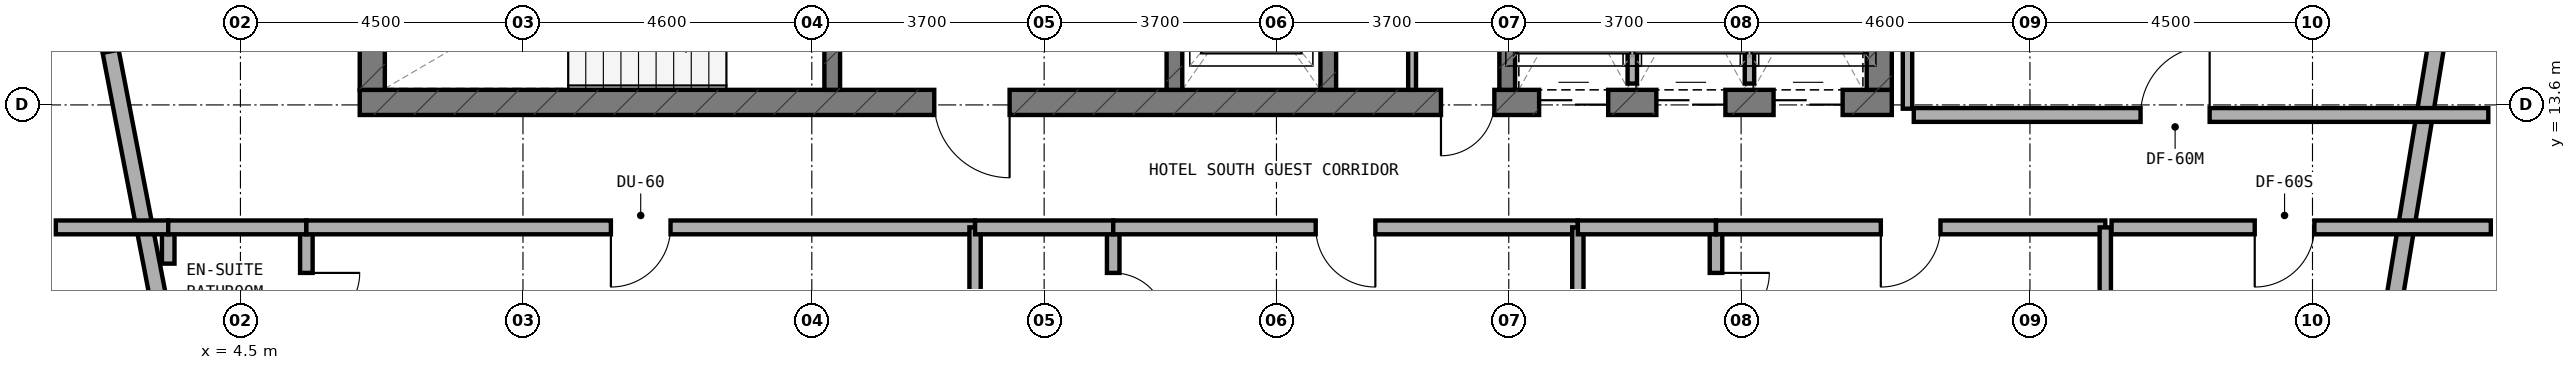
"""IFC4 building model, lengths in metres.
Left out: names, types, materials, properties, quantities, classifications, styles, units other than length and angle.
Written with IfcOpenShell. Run it as: python <this file> out.ifc"""

import sys

from ifc_helpers import new_model, si_unit, direction, frame, frame_2d, origin, place, context, subcontext, project, spatial, rectangle, extrude, element, fill, save


model = new_model("IFC4")
c1 = context("Model", 3, precision=1e-05, world=origin(), true_north=direction((0.0, 1.0)))
c2 = subcontext(c1, "Body", "Model", "MODEL_VIEW")
j1 = project(units=[si_unit("LENGTHUNIT", "METRE"), si_unit("PLANEANGLEUNIT", "RADIAN")], contexts=[c1])
p1 = place(None, origin())
s1 = spatial("IfcSite", under=j1, at=p1, CompositionType="ELEMENT")
p2 = place(p1, origin())
s2 = spatial("IfcBuilding", under=s1, at=p2, CompositionType="ELEMENT")
p3 = place(p2, frame((0.0, 0.0, 181.1)))
s3 = spatial("IfcBuildingStorey", under=s2, at=p3, CompositionType="ELEMENT", Elevation=181.1)
p4 = place(p3, frame((6.4, 13.64, 0.0), z_axis=(0.0, 0.0, 1.0), x_axis=(1.0, 0.0, 0.0)))
e1 = element("IfcWall", 1, at=p4, inside=s3, PredefinedType="SHEAR", context=c2, shape_type="SweptSolid", body=[
    extrude(rectangle(XDim=24.4, YDim=0.4, at=frame_2d((12.2, 0.0))), origin(), (0.0, 0.0, 1.0), 3.6),
])
p5 = place(p4, frame((9.15, 0.0, 0.0)))
e2 = element("IfcOpeningElement", 2, at=p5, cuts=e1, PredefinedType="OPENING", context=c2, shape_type="SweptSolid", body=[
    extrude(rectangle(XDim=1.2, YDim=2.15, at=frame_2d((0.6, 1.075))), frame((0.0, 0.21, 0.0), z_axis=(0.0, -1.0, 0.0), x_axis=(1.0, 0.0, 0.0)), (0.0, 0.0, 1.0), 0.42),
])
p6 = place(p4, frame((17.22, 0.0, 0.0)))
e3 = element("IfcOpeningElement", 3, at=p6, cuts=e1, PredefinedType="OPENING", context=c2, shape_type="SweptSolid", body=[
    extrude(rectangle(XDim=0.85, YDim=2.1, at=frame_2d((0.425, 1.05))), frame((0.0, 0.21, 0.0), z_axis=(0.0, -1.0, 0.0), x_axis=(1.0, 0.0, 0.0)), (0.0, 0.0, 1.0), 0.42),
])
p7 = place(p4, frame((18.783, 0.0, 0.0)))
e4 = element("IfcOpeningElement", 4, at=p7, cuts=e1, PredefinedType="OPENING", context=c2, shape_type="SweptSolid", body=[
    extrude(rectangle(XDim=1.1, YDim=2.15, at=frame_2d((0.55, 1.075))), frame((0.0, 0.21, 0.0), z_axis=(0.0, -1.0, 0.0), x_axis=(1.0, 0.0, 0.0)), (0.0, 0.0, 1.0), 0.42),
])
p8 = place(p4, frame((20.65, 0.0, 0.0)))
e5 = element("IfcOpeningElement", 5, at=p8, cuts=e1, PredefinedType="OPENING", context=c2, shape_type="SweptSolid", body=[
    extrude(rectangle(XDim=1.1, YDim=2.15, at=frame_2d((0.55, 1.075))), frame((0.0, 0.21, 0.0), z_axis=(0.0, -1.0, 0.0), x_axis=(1.0, 0.0, 0.0)), (0.0, 0.0, 1.0), 0.42),
])
p9 = place(p4, frame((22.517, 0.0, 0.0)))
e6 = element("IfcOpeningElement", 6, at=p9, cuts=e1, PredefinedType="OPENING", context=c2, shape_type="SweptSolid", body=[
    extrude(rectangle(XDim=1.1, YDim=2.15, at=frame_2d((0.55, 1.075))), frame((0.0, 0.21, 0.0), z_axis=(0.0, -1.0, 0.0), x_axis=(1.0, 0.0, 0.0)), (0.0, 0.0, 1.0), 0.42),
])
for number, where, z_axis, x_axis in (
    (7, (6.6, 13.84, 0.0), (0.0, 0.0, 1.0), (0.0, 1.0, 0.0)),
    (8, (30.6, 13.84, 0.0), (0.0, 0.0, 1.0), (0.0, 1.0, 0.0)),
):
    element("IfcWall", number, at=place(p3, frame(where, z_axis=z_axis, x_axis=x_axis)), inside=s3, PredefinedType="SHEAR", context=c2, shape_type="SweptSolid", body=[
        extrude(rectangle(XDim=3.16, YDim=0.4, at=frame_2d((1.58, 0.0))), origin(), (0.0, 0.0, 1.0), 3.6),
    ])
p10 = place(p3, frame((13.925, 13.84, 0.0), z_axis=(0.0, 0.0, 1.0), x_axis=(0.0, 1.0, 0.0)))
e9 = element("IfcWall", 9, at=p10, inside=s3, PredefinedType="STANDARD", context=c2, shape_type="SweptSolid", body=[
    extrude(rectangle(XDim=3.16, YDim=0.25, at=frame_2d((1.58, 0.0))), origin(), (0.0, 0.0, 1.0), 3.32),
])
p11 = place(p10, frame((0.98, 0.0, 0.0)))
e10 = element("IfcOpeningElement", 10, at=p11, cuts=e9, PredefinedType="OPENING", context=c2, shape_type="SweptSolid", body=[
    extrude(rectangle(XDim=1.1, YDim=2.15, at=frame_2d((0.55, 1.075))), frame((0.0, 0.135, 0.0), z_axis=(0.0, -1.0, 0.0), x_axis=(1.0, 0.0, 0.0)), (0.0, 0.0, 1.0), 0.27),
])
p12 = place(p3, frame((19.375, 13.84, 0.0), z_axis=(0.0, 0.0, 1.0), x_axis=(0.0, 1.0, 0.0)))
e11 = element("IfcWall", 11, at=p12, inside=s3, PredefinedType="STANDARD", context=c2, shape_type="SweptSolid", body=[
    extrude(rectangle(XDim=3.16, YDim=0.25, at=frame_2d((1.58, 0.0))), origin(), (0.0, 0.0, 1.0), 3.32),
])
p13 = place(p12, frame((0.98, 0.0, 0.0)))
e12 = element("IfcOpeningElement", 12, at=p13, cuts=e11, PredefinedType="OPENING", context=c2, shape_type="SweptSolid", body=[
    extrude(rectangle(XDim=1.1, YDim=2.15, at=frame_2d((0.55, 1.075))), frame((0.0, 0.135, 0.0), z_axis=(0.0, -1.0, 0.0), x_axis=(1.0, 0.0, 0.0)), (0.0, 0.0, 1.0), 0.27),
])
for number, where, z_axis, x_axis in (
    (13, (21.825, 13.84, 0.0), (0.0, 0.0, 1.0), (0.0, 1.0, 0.0)),
    (14, (24.675, 13.84, 0.0), (0.0, 0.0, 1.0), (0.0, 1.0, 0.0)),
):
    element("IfcWall", number, at=place(p3, frame(where, z_axis=z_axis, x_axis=x_axis)), inside=s3, PredefinedType="STANDARD", context=c2, shape_type="SweptSolid", body=[
        extrude(rectangle(XDim=3.16, YDim=0.25, at=frame_2d((1.58, 0.0))), origin(), (0.0, 0.0, 1.0), 3.32),
    ])
p14 = place(p3, frame((38.771, 10.313, 0.0), z_axis=(0.0, 0.0, 1.0), x_axis=(0.16277908586, 0.986662540693, 0.0)))
e15 = element("IfcWall", 15, at=p14, inside=s3, PredefinedType="STANDARD", context=c2, shape_type="SweptSolid", body=[
    extrude(rectangle(XDim=10.437, YDim=0.26, at=frame_2d((5.219, 0.0))), origin(), (0.0, 0.0, 1.0), 3.32),
])
p15 = place(p14, frame((5.81, 0.0, 0.85)))
e16 = element("IfcOpeningElement", 16, at=p15, cuts=e15, PredefinedType="OPENING", context=c2, shape_type="SweptSolid", body=[
    extrude(rectangle(XDim=2.1, YDim=1.5, at=frame_2d((1.05, 0.75))), frame((0.0, 0.14, 0.0), z_axis=(0.0, -1.0, 0.0), x_axis=(1.0, 0.0, 0.0)), (0.0, 0.0, 1.0), 0.28),
])
p16 = place(p3, frame((1.518, 19.199, 0.0), z_axis=(0.0, 0.0, 1.0), x_axis=(0.189254809039, -0.98192801022, 0.0)))
e17 = element("IfcWall", 17, at=p16, inside=s3, PredefinedType="STANDARD", context=c2, shape_type="SweptSolid", body=[
    extrude(rectangle(XDim=9.046, YDim=0.26, at=frame_2d((4.523, 0.0))), origin(), (0.0, 0.0, 1.0), 3.32),
])
p17 = place(p16, frame((2.733, 0.0, 0.85)))
e18 = element("IfcOpeningElement", 18, at=p17, cuts=e17, PredefinedType="OPENING", context=c2, shape_type="SweptSolid", body=[
    extrude(rectangle(XDim=2.1, YDim=1.5, at=frame_2d((1.05, 0.75))), frame((0.0, 0.14, 0.0), z_axis=(0.0, -1.0, 0.0), x_axis=(1.0, 0.0, 0.0)), (0.0, 0.0, 1.0), 0.28),
])
p18 = place(p3, frame((23.16, 13.84, 0.0), z_axis=(0.0, 0.0, 1.0), x_axis=(0.0, 1.0, 0.0)))
e19 = element("IfcWall", 19, at=p18, inside=s3, PredefinedType="PARTITIONING", context=c2, shape_type="SweptSolid", body=[
    extrude(rectangle(XDim=1.34, YDim=0.125, at=frame_2d((0.67, 0.0))), origin(), (0.0, 0.0, 1.0), 3.32),
])
p19 = place(p3, frame((26.667, 13.94, 0.0), z_axis=(0.0, 0.0, 1.0), x_axis=(0.0, 1.0, 0.0)))
e20 = element("IfcWall", 20, at=p19, inside=s3, PredefinedType="PARTITIONING", context=c2, shape_type="SweptSolid", body=[
    extrude(rectangle(XDim=2.96, YDim=0.15, at=frame_2d((1.48, 0.0))), origin(), (0.0, 0.0, 1.0), 3.32),
])
p20 = place(p3, frame((28.533, 13.94, 0.0), z_axis=(0.0, 0.0, 1.0), x_axis=(0.0, 1.0, 0.0)))
e21 = element("IfcWall", 21, at=p20, inside=s3, PredefinedType="PARTITIONING", context=c2, shape_type="SweptSolid", body=[
    extrude(rectangle(XDim=2.96, YDim=0.15, at=frame_2d((1.48, 0.0))), origin(), (0.0, 0.0, 1.0), 2.995),
])
p21 = place(p3, frame((5.55, 9.45, 0.0), z_axis=(0.0, 0.0, 1.0), x_axis=(0.0, 1.0, 0.0)))
e22 = element("IfcWall", 22, at=p21, inside=s3, PredefinedType="PLUMBINGWALL", context=c2, shape_type="SweptSolid", body=[
    extrude(rectangle(XDim=2.1, YDim=0.2, at=frame_2d((1.05, 0.0))), origin(), (0.0, 0.0, 1.0), 3.32),
])
p22 = place(p21, frame((0.625, 0.0, 0.0)))
e23 = element("IfcOpeningElement", 23, at=p22, cuts=e22, PredefinedType="OPENING", context=c2, shape_type="SweptSolid", body=[
    extrude(rectangle(XDim=0.85, YDim=2.1, at=frame_2d((0.425, 1.05))), frame((0.0, 0.11, 0.0), z_axis=(0.0, -1.0, 0.0), x_axis=(1.0, 0.0, 0.0)), (0.0, 0.0, 1.0), 0.22),
])
p23 = place(p3, frame((3.35, 11.073, 0.0), z_axis=(0.0, 0.0, 1.0), x_axis=(0.0, 1.0, 0.0)))
e24 = element("IfcWall", 24, at=p23, inside=s3, PredefinedType="PLUMBINGWALL", context=c2, shape_type="SweptSolid", body=[
    extrude(rectangle(XDim=0.577, YDim=0.2, at=frame_2d((0.289, 0.0))), origin(), (0.0, 0.0, 1.0), 3.32),
])
p24 = place(p3, frame((1.56, 11.65, 0.0), z_axis=(0.0, 0.0, 1.0), x_axis=(1.0, 0.0, 0.0)))
e25 = element("IfcWall", 25, at=p24, inside=s3, PredefinedType="SOLIDWALL", context=c2, shape_type="SweptSolid", body=[
    extrude(rectangle(XDim=1.79, YDim=0.22, at=frame_2d((0.895, 0.0))), origin(), (0.0, 0.0, 1.0), 3.32),
])
p25 = place(p3, frame((3.35, 11.65, 0.0), z_axis=(0.0, 0.0, 1.0), x_axis=(1.0, 0.0, 0.0)))
e26 = element("IfcWall", 26, at=p25, inside=s3, PredefinedType="SOLIDWALL", context=c2, shape_type="SweptSolid", body=[
    extrude(rectangle(XDim=2.2, YDim=0.22, at=frame_2d((1.1, 0.0))), origin(), (0.0, 0.0, 1.0), 3.32),
])
p26 = place(p3, frame((5.55, 11.65, 0.0), z_axis=(0.0, 0.0, 1.0), x_axis=(1.0, 0.0, 0.0)))
e27 = element("IfcWall", 27, at=p26, inside=s3, PredefinedType="SOLIDWALL", context=c2, shape_type="SweptSolid", body=[
    extrude(rectangle(XDim=10.65, YDim=0.22, at=frame_2d((5.325, 0.0))), origin(), (0.0, 0.0, 1.0), 2.995),
])
p27 = place(p26, frame((4.85, 0.0, 0.0)))
e28 = element("IfcOpeningElement", 28, at=p27, cuts=e27, PredefinedType="OPENING", context=c2, shape_type="SweptSolid", body=[
    extrude(rectangle(XDim=0.95, YDim=2.1, at=frame_2d((0.475, 1.05))), frame((0.0, 0.12, 0.0), z_axis=(0.0, -1.0, 0.0), x_axis=(1.0, 0.0, 0.0)), (0.0, 0.0, 1.0), 0.24),
])
p28 = place(p3, frame((16.2, 5.46, 0.0), z_axis=(0.0, 0.0, 1.0), x_axis=(0.0, 1.0, 0.0)))
e29 = element("IfcWall", 29, at=p28, inside=s3, PredefinedType="SOLIDWALL", context=c2, shape_type="SweptSolid", body=[
    extrude(rectangle(XDim=6.19, YDim=0.18, at=frame_2d((3.095, 0.0))), origin(), (0.0, 0.0, 1.0), 2.935),
])
p29 = place(p3, frame((18.4, 9.45, 0.0), z_axis=(0.0, 0.0, 1.0), x_axis=(0.0, 1.0, 0.0)))
e30 = element("IfcWall", 30, at=p29, inside=s3, PredefinedType="PLUMBINGWALL", context=c2, shape_type="SweptSolid", body=[
    extrude(rectangle(XDim=2.1, YDim=0.2, at=frame_2d((1.05, 0.0))), origin(), (0.0, 0.0, 1.0), 2.895),
])
p30 = place(p29, frame((0.625, 0.0, 0.0)))
e31 = element("IfcOpeningElement", 31, at=p30, cuts=e30, PredefinedType="OPENING", context=c2, shape_type="SweptSolid", body=[
    extrude(rectangle(XDim=0.85, YDim=2.1, at=frame_2d((0.425, 1.05))), frame((0.0, 0.11, 0.0), z_axis=(0.0, -1.0, 0.0), x_axis=(1.0, 0.0, 0.0)), (0.0, 0.0, 1.0), 0.22),
])
p31 = place(p3, frame((16.2, 11.65, 0.0), z_axis=(0.0, 0.0, 1.0), x_axis=(1.0, 0.0, 0.0)))
e32 = element("IfcWall", 32, at=p31, inside=s3, PredefinedType="SOLIDWALL", context=c2, shape_type="SweptSolid", body=[
    extrude(rectangle(XDim=2.2, YDim=0.22, at=frame_2d((1.1, 0.0))), origin(), (0.0, 0.0, 1.0), 2.995),
])
p32 = place(p3, frame((18.4, 11.65, 0.0), z_axis=(0.0, 0.0, 1.0), x_axis=(1.0, 0.0, 0.0)))
e33 = element("IfcWall", 33, at=p32, inside=s3, PredefinedType="SOLIDWALL", context=c2, shape_type="SweptSolid", body=[
    extrude(rectangle(XDim=7.4, YDim=0.22, at=frame_2d((3.7, 0.0))), origin(), (0.0, 0.0, 1.0), 2.995),
])
p33 = place(p32, frame((3.225, 0.0, 0.0)))
e34 = element("IfcOpeningElement", 34, at=p33, cuts=e33, PredefinedType="OPENING", context=c2, shape_type="SweptSolid", body=[
    extrude(rectangle(XDim=0.95, YDim=2.1, at=frame_2d((0.475, 1.05))), frame((0.0, 0.12, 0.0), z_axis=(0.0, -1.0, 0.0), x_axis=(1.0, 0.0, 0.0)), (0.0, 0.0, 1.0), 0.24),
])
p34 = place(p3, frame((25.8, 5.46, 0.0), z_axis=(0.0, 0.0, 1.0), x_axis=(0.0, 1.0, 0.0)))
e35 = element("IfcWall", 35, at=p34, inside=s3, PredefinedType="SOLIDWALL", context=c2, shape_type="SweptSolid", body=[
    extrude(rectangle(XDim=6.19, YDim=0.18, at=frame_2d((3.095, 0.0))), origin(), (0.0, 0.0, 1.0), 2.935),
])
p35 = place(p3, frame((28.0, 9.45, 0.0), z_axis=(0.0, 0.0, 1.0), x_axis=(0.0, 1.0, 0.0)))
e36 = element("IfcWall", 36, at=p35, inside=s3, PredefinedType="PLUMBINGWALL", context=c2, shape_type="SweptSolid", body=[
    extrude(rectangle(XDim=2.1, YDim=0.2, at=frame_2d((1.05, 0.0))), origin(), (0.0, 0.0, 1.0), 2.895),
])
p36 = place(p35, frame((0.625, 0.0, 0.0)))
e37 = element("IfcOpeningElement", 37, at=p36, cuts=e36, PredefinedType="OPENING", context=c2, shape_type="SweptSolid", body=[
    extrude(rectangle(XDim=0.85, YDim=2.1, at=frame_2d((0.425, 1.05))), frame((0.0, 0.11, 0.0), z_axis=(0.0, -1.0, 0.0), x_axis=(1.0, 0.0, 0.0)), (0.0, 0.0, 1.0), 0.22),
])
p37 = place(p3, frame((25.8, 11.65, 0.0), z_axis=(0.0, 0.0, 1.0), x_axis=(1.0, 0.0, 0.0)))
e38 = element("IfcWall", 38, at=p37, inside=s3, PredefinedType="SOLIDWALL", context=c2, shape_type="SweptSolid", body=[
    extrude(rectangle(XDim=2.2, YDim=0.22, at=frame_2d((1.1, 0.0))), origin(), (0.0, 0.0, 1.0), 2.995),
])
p38 = place(p3, frame((28.0, 11.65, 0.0), z_axis=(0.0, 0.0, 1.0), x_axis=(1.0, 0.0, 0.0)))
e39 = element("IfcWall", 39, at=p38, inside=s3, PredefinedType="SOLIDWALL", context=c2, shape_type="SweptSolid", body=[
    extrude(rectangle(XDim=6.2, YDim=0.22, at=frame_2d((3.1, 0.0))), origin(), (0.0, 0.0, 1.0), 2.995),
])
p39 = place(p38, frame((2.625, 0.0, 0.0)))
e40 = element("IfcOpeningElement", 40, at=p39, cuts=e39, PredefinedType="OPENING", context=c2, shape_type="SweptSolid", body=[
    extrude(rectangle(XDim=0.95, YDim=2.1, at=frame_2d((0.475, 1.05))), frame((0.0, 0.12, 0.0), z_axis=(0.0, -1.0, 0.0), x_axis=(1.0, 0.0, 0.0)), (0.0, 0.0, 1.0), 0.24),
])
p40 = place(p3, frame((34.2, 6.872, 0.0), z_axis=(0.0, 0.0, 1.0), x_axis=(0.0, 1.0, 0.0)))
e41 = element("IfcWall", 41, at=p40, inside=s3, PredefinedType="SOLIDWALL", context=c2, shape_type="SweptSolid", body=[
    extrude(rectangle(XDim=4.778, YDim=0.18, at=frame_2d((2.389, 0.0))), origin(), (0.0, 0.0, 1.0), 2.935),
])
p41 = place(p3, frame((34.3, 11.65, 0.0), z_axis=(0.0, 0.0, 1.0), x_axis=(1.0, 0.0, 0.0)))
e42 = element("IfcWall", 42, at=p41, inside=s3, PredefinedType="SOLIDWALL", context=c2, shape_type="SweptSolid", body=[
    extrude(rectangle(XDim=6.04, YDim=0.22, at=frame_2d((3.02, 0.0))), origin(), (0.0, 0.0, 1.0), 2.935),
])
p42 = place(p41, frame((2.28, 0.0, 0.0)))
e43 = element("IfcOpeningElement", 43, at=p42, cuts=e42, PredefinedType="OPENING", context=c2, shape_type="SweptSolid", body=[
    extrude(rectangle(XDim=0.95, YDim=2.1, at=frame_2d((0.475, 1.05))), frame((0.0, 0.12, 0.0), z_axis=(0.0, -1.0, 0.0), x_axis=(1.0, 0.0, 0.0)), (0.0, 0.0, 1.0), 0.24),
])
p43 = place(p3, frame((31.05, 13.54, 0.0), z_axis=(0.0, 0.0, 1.0), x_axis=(0.0, 1.0, 0.0)))
e44 = element("IfcWall", 44, at=p43, inside=s3, PredefinedType="PARTITIONING", context=c2, shape_type="SweptSolid", body=[
    extrude(rectangle(XDim=6.66, YDim=0.15, at=frame_2d((3.33, 0.0))), origin(), (0.0, 0.0, 1.0), 2.995),
])
p44 = place(p3, frame((31.15, 13.44, 0.0), z_axis=(0.0, 0.0, 1.0), x_axis=(1.0, 0.0, 0.0)))
e45 = element("IfcWall", 45, at=p44, inside=s3, PredefinedType="SOLIDWALL", context=c2, shape_type="SweptSolid", body=[
    extrude(rectangle(XDim=9.15, YDim=0.22, at=frame_2d((4.575, 0.0))), origin(), (0.0, 0.0, 1.0), 2.935),
])
p45 = place(p44, frame((3.612, 0.0, 0.0)))
e46 = element("IfcOpeningElement", 46, at=p45, cuts=e45, PredefinedType="OPENING", context=c2, shape_type="SweptSolid", body=[
    extrude(rectangle(XDim=1.1, YDim=2.1, at=frame_2d((0.55, 1.05))), frame((0.0, 0.12, 0.0), z_axis=(0.0, -1.0, 0.0), x_axis=(1.0, 0.0, 0.0)), (0.0, 0.0, 1.0), 0.24),
])
p46 = place(p5, frame((1.2, 0.0, 0.0), z_axis=(0.0, 0.0, 1.0), x_axis=(-1.0, 0.0, 0.0)))
e47 = element("IfcDoor", 47, at=p46, inside=s3, OperationType="SINGLE_SWING_LEFT", PredefinedType="DOOR", context=c2, shape_type="SweptSolid", body=[
    extrude(rectangle(XDim=1.2, YDim=2.15, at=frame_2d((0.6, 1.075))), frame((0.0, 0.025, 0.0), z_axis=(0.0, -1.0, 0.0), x_axis=(1.0, 0.0, 0.0)), (0.0, 0.0, 1.0), 0.05),
])
fill(e2, e47)
p47 = place(p6, frame((0.85, 0.0, 0.0), z_axis=(0.0, 0.0, 1.0), x_axis=(-1.0, 0.0, 0.0)))
e48 = element("IfcDoor", 48, at=p47, inside=s3, OperationType="SINGLE_SWING_RIGHT", PredefinedType="DOOR", context=c2, shape_type="SweptSolid", body=[
    extrude(rectangle(XDim=0.85, YDim=2.1, at=frame_2d((0.425, 1.05))), frame((0.0, 0.025, 0.0), z_axis=(0.0, -1.0, 0.0), x_axis=(1.0, 0.0, 0.0)), (0.0, 0.0, 1.0), 0.05),
])
fill(e3, e48)
p48 = place(p7, frame((1.1, 0.0, 0.0), z_axis=(0.0, 0.0, 1.0), x_axis=(-1.0, 0.0, 0.0)))
e49 = element("IfcDoor", 49, at=p48, inside=s3, OperationType="DOUBLE_DOOR_SLIDING", PredefinedType="DOOR", context=c2, shape_type="SweptSolid", body=[
    extrude(rectangle(XDim=1.1, YDim=2.15, at=frame_2d((0.55, 1.075))), frame((0.0, 0.025, 0.0), z_axis=(0.0, -1.0, 0.0), x_axis=(1.0, 0.0, 0.0)), (0.0, 0.0, 1.0), 0.05),
])
fill(e4, e49)
p49 = place(p8, frame((1.1, 0.0, 0.0), z_axis=(0.0, 0.0, 1.0), x_axis=(-1.0, 0.0, 0.0)))
e50 = element("IfcDoor", 50, at=p49, inside=s3, OperationType="DOUBLE_DOOR_SLIDING", PredefinedType="DOOR", context=c2, shape_type="SweptSolid", body=[
    extrude(rectangle(XDim=1.1, YDim=2.15, at=frame_2d((0.55, 1.075))), frame((0.0, 0.025, 0.0), z_axis=(0.0, -1.0, 0.0), x_axis=(1.0, 0.0, 0.0)), (0.0, 0.0, 1.0), 0.05),
])
fill(e5, e50)
p50 = place(p9, frame((1.1, 0.0, 0.0), z_axis=(0.0, 0.0, 1.0), x_axis=(-1.0, 0.0, 0.0)))
e51 = element("IfcDoor", 51, at=p50, inside=s3, OperationType="DOUBLE_DOOR_SLIDING", PredefinedType="DOOR", context=c2, shape_type="SweptSolid", body=[
    extrude(rectangle(XDim=1.1, YDim=2.15, at=frame_2d((0.55, 1.075))), frame((0.0, 0.025, 0.0), z_axis=(0.0, -1.0, 0.0), x_axis=(1.0, 0.0, 0.0)), (0.0, 0.0, 1.0), 0.05),
])
fill(e6, e51)
p51 = place(p22, frame((0.85, 0.0, 0.0), z_axis=(0.0, 0.0, 1.0), x_axis=(-1.0, 0.0, 0.0)))
e52 = element("IfcDoor", 52, at=p51, inside=s3, OperationType="SINGLE_SWING_LEFT", PredefinedType="DOOR", context=c2, shape_type="SweptSolid", body=[
    extrude(rectangle(XDim=0.85, YDim=2.1, at=frame_2d((0.425, 1.05))), frame((0.0, 0.025, 0.0), z_axis=(0.0, -1.0, 0.0), x_axis=(1.0, 0.0, 0.0)), (0.0, 0.0, 1.0), 0.05),
])
fill(e23, e52)
p52 = place(p27, frame((0.95, 0.0, 0.0), z_axis=(0.0, 0.0, 1.0), x_axis=(-1.0, 0.0, 0.0)))
e53 = element("IfcDoor", 53, at=p52, inside=s3, OperationType="SINGLE_SWING_RIGHT", PredefinedType="DOOR", context=c2, shape_type="SweptSolid", body=[
    extrude(rectangle(XDim=0.95, YDim=2.1, at=frame_2d((0.475, 1.05))), frame((0.0, 0.025, 0.0), z_axis=(0.0, -1.0, 0.0), x_axis=(1.0, 0.0, 0.0)), (0.0, 0.0, 1.0), 0.05),
])
fill(e28, e53)
p53 = place(p30, frame((0.85, 0.0, 0.0), z_axis=(0.0, 0.0, 1.0), x_axis=(-1.0, 0.0, 0.0)))
e54 = element("IfcDoor", 54, at=p53, inside=s3, OperationType="SINGLE_SWING_RIGHT", PredefinedType="DOOR", context=c2, shape_type="SweptSolid", body=[
    extrude(rectangle(XDim=0.85, YDim=2.1, at=frame_2d((0.425, 1.05))), frame((0.0, 0.025, 0.0), z_axis=(0.0, -1.0, 0.0), x_axis=(1.0, 0.0, 0.0)), (0.0, 0.0, 1.0), 0.05),
])
fill(e31, e54)
p54 = place(p33, frame((0.95, 0.0, 0.0), z_axis=(0.0, 0.0, 1.0), x_axis=(-1.0, 0.0, 0.0)))
e55 = element("IfcDoor", 55, at=p54, inside=s3, OperationType="SINGLE_SWING_LEFT", PredefinedType="DOOR", context=c2, shape_type="SweptSolid", body=[
    extrude(rectangle(XDim=0.95, YDim=2.1, at=frame_2d((0.475, 1.05))), frame((0.0, 0.025, 0.0), z_axis=(0.0, -1.0, 0.0), x_axis=(1.0, 0.0, 0.0)), (0.0, 0.0, 1.0), 0.05),
])
fill(e34, e55)
p55 = place(p36, frame((0.85, 0.0, 0.0), z_axis=(0.0, 0.0, 1.0), x_axis=(-1.0, 0.0, 0.0)))
e56 = element("IfcDoor", 56, at=p55, inside=s3, OperationType="SINGLE_SWING_LEFT", PredefinedType="DOOR", context=c2, shape_type="SweptSolid", body=[
    extrude(rectangle(XDim=0.85, YDim=2.1, at=frame_2d((0.425, 1.05))), frame((0.0, 0.025, 0.0), z_axis=(0.0, -1.0, 0.0), x_axis=(1.0, 0.0, 0.0)), (0.0, 0.0, 1.0), 0.05),
])
fill(e37, e56)
p56 = place(p39, frame((0.95, 0.0, 0.0), z_axis=(0.0, 0.0, 1.0), x_axis=(-1.0, 0.0, 0.0)))
e57 = element("IfcDoor", 57, at=p56, inside=s3, OperationType="SINGLE_SWING_RIGHT", PredefinedType="DOOR", context=c2, shape_type="SweptSolid", body=[
    extrude(rectangle(XDim=0.95, YDim=2.1, at=frame_2d((0.475, 1.05))), frame((0.0, 0.025, 0.0), z_axis=(0.0, -1.0, 0.0), x_axis=(1.0, 0.0, 0.0)), (0.0, 0.0, 1.0), 0.05),
])
fill(e40, e57)
p57 = place(p42, frame((0.95, 0.0, 0.0), z_axis=(0.0, 0.0, 1.0), x_axis=(-1.0, 0.0, 0.0)))
e58 = element("IfcDoor", 58, at=p57, inside=s3, OperationType="SINGLE_SWING_RIGHT", PredefinedType="DOOR", context=c2, shape_type="SweptSolid", body=[
    extrude(rectangle(XDim=0.95, YDim=2.1, at=frame_2d((0.475, 1.05))), frame((0.0, 0.025, 0.0), z_axis=(0.0, -1.0, 0.0), x_axis=(1.0, 0.0, 0.0)), (0.0, 0.0, 1.0), 0.05),
])
fill(e43, e58)
p58 = place(p45, origin())
e59 = element("IfcDoor", 59, at=p58, inside=s3, OperationType="SINGLE_SWING_RIGHT", PredefinedType="DOOR", context=c2, shape_type="SweptSolid", body=[
    extrude(rectangle(XDim=1.1, YDim=2.1, at=frame_2d((0.55, 1.05))), frame((0.0, 0.025, 0.0), z_axis=(0.0, -1.0, 0.0), x_axis=(1.0, 0.0, 0.0)), (0.0, 0.0, 1.0), 0.05),
])
fill(e46, e59)
save(model, sys.argv[1])
